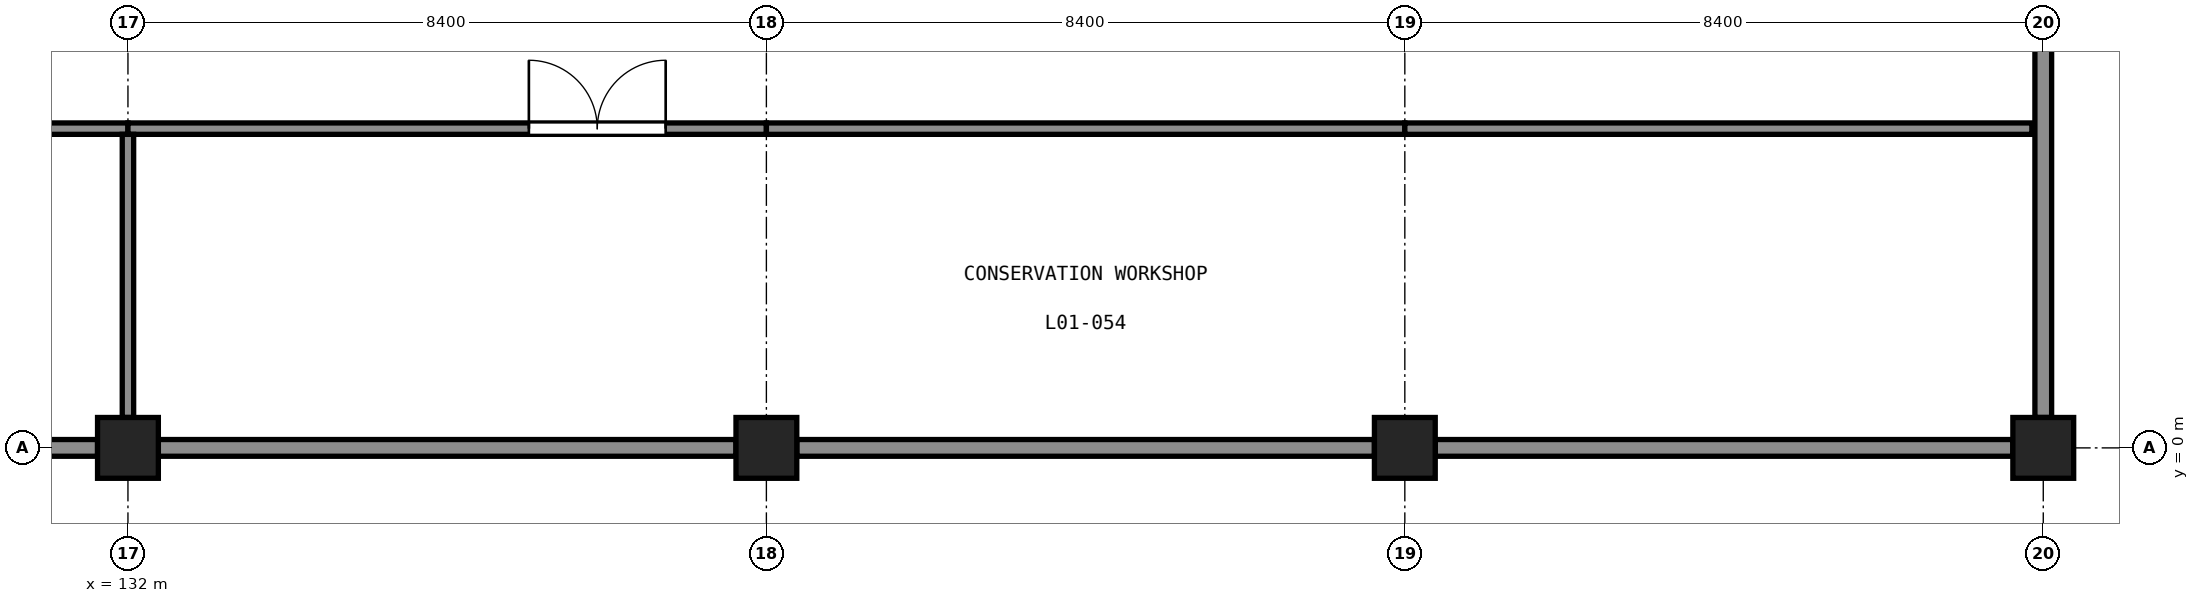
"""IFC4 building model, lengths in metres.
Left out: names, types, materials, properties, quantities, classifications, styles, units other than length and angle.
Written with IfcOpenShell. Run it as: python <this file> out.ifc"""

import sys

from ifc_helpers import new_model, si_unit, direction, frame, frame_2d, origin, origin_2d, place, context, subcontext, project, spatial, rectangle, extrude, element, fill, save


model = new_model("IFC4")
c1 = context("Model", 3, precision=1e-05, world=origin(), true_north=direction((0.0, 1.0)))
c2 = subcontext(c1, "Body", "Model", "MODEL_VIEW")
j1 = project(units=[si_unit("LENGTHUNIT", "METRE"), si_unit("PLANEANGLEUNIT", "RADIAN")], contexts=[c1])
p1 = place(None, origin())
s1 = spatial("IfcSite", under=j1, at=p1, CompositionType="ELEMENT")
p2 = place(p1, origin())
s2 = spatial("IfcBuilding", under=s1, at=p2, CompositionType="ELEMENT")
p3 = place(p2, frame((0.0, 0.0, 5.5)))
s3 = spatial("IfcBuildingStorey", under=s2, at=p3, CompositionType="ELEMENT", Elevation=5.5)
for number, where, z_axis, x_axis in (
    (1, (132.0, 0.0, 0.0), (0.0, 0.0, 1.0), (1.0, 0.0, 0.0)),
    (2, (140.4, 0.0, 0.0), (0.0, 0.0, 1.0), (1.0, 0.0, 0.0)),
    (3, (148.8, 0.0, 0.0), (0.0, 0.0, 1.0), (1.0, 0.0, 0.0)),
    (4, (157.2, 0.0, 0.0), (0.0, 0.0, 1.0), (1.0, 0.0, 0.0)),
):
    element("IfcColumn", number, at=place(p3, frame(where, z_axis=z_axis, x_axis=x_axis)), inside=s3, PredefinedType="COLUMN", context=c2, shape_type="SweptSolid", body=[
        extrude(rectangle(XDim=0.8, YDim=0.8, at=origin_2d()), origin(), (0.0, 0.0, 1.0), 5.0),
    ])
for number, where, z_axis, x_axis in (
    (5, (124.0, 0.0, 0.0), (0.0, 0.0, 1.0), (1.0, 0.0, 0.0)),
    (6, (132.4, 0.0, 0.0), (0.0, 0.0, 1.0), (1.0, 0.0, 0.0)),
):
    element("IfcWall", number, at=place(p3, frame(where, z_axis=z_axis, x_axis=x_axis)), inside=s3, PredefinedType="SOLIDWALL", context=c2, shape_type="SweptSolid", body=[
        extrude(rectangle(XDim=7.6, YDim=0.22, at=frame_2d((3.8, 0.0))), origin(), (0.0, 0.0, 1.0), 3.94),
    ])
p4 = place(p3, frame((140.8, 0.0, 0.0), z_axis=(0.0, 0.0, 1.0), x_axis=(1.0, 0.0, 0.0)))
e7 = element("IfcWall", 7, at=p4, inside=s3, PredefinedType="SOLIDWALL", context=c2, shape_type="SweptSolid", body=[
    extrude(rectangle(XDim=7.6, YDim=0.22, at=frame_2d((3.8, 0.0))), origin(), (0.0, 0.0, 1.0), 3.94),
])
for number, where, z_axis, x_axis in (
    (8, (149.2, 0.0, 0.0), (0.0, 0.0, 1.0), (1.0, 0.0, 0.0)),
    (9, (157.2, 0.4, 0.0), (0.0, 0.0, 1.0), (0.0, 1.0, 0.0)),
):
    element("IfcWall", number, at=place(p3, frame(where, z_axis=z_axis, x_axis=x_axis)), inside=s3, PredefinedType="SOLIDWALL", context=c2, shape_type="SweptSolid", body=[
        extrude(rectangle(XDim=7.6, YDim=0.22, at=frame_2d((3.8, 0.0))), origin(), (0.0, 0.0, 1.0), 3.94),
    ])
p5 = place(p3, frame((123.6, 4.2, 0.0), z_axis=(0.0, 0.0, 1.0), x_axis=(1.0, 0.0, 0.0)))
e10 = element("IfcWall", 10, at=p5, inside=s3, PredefinedType="PARTITIONING", context=c2, shape_type="SweptSolid", body=[
    extrude(rectangle(XDim=8.4, YDim=0.15, at=frame_2d((4.2, 0.0))), origin(), (0.0, 0.0, 1.0), 3.9),
])
p6 = place(p3, frame((132.0, 4.2, 0.0), z_axis=(0.0, 0.0, 1.0), x_axis=(1.0, 0.0, 0.0)))
e11 = element("IfcWall", 11, at=p6, inside=s3, PredefinedType="PARTITIONING", context=c2, shape_type="SweptSolid", body=[
    extrude(rectangle(XDim=8.4, YDim=0.15, at=frame_2d((4.2, 0.0))), origin(), (0.0, 0.0, 1.0), 3.9),
])
p7 = place(p6, frame((5.275, 0.0, 0.0)))
e12 = element("IfcOpeningElement", 12, at=p7, cuts=e11, PredefinedType="OPENING", context=c2, shape_type="SweptSolid", body=[
    extrude(rectangle(XDim=1.8, YDim=2.1, at=frame_2d((0.9, 1.05))), frame((0.0, 0.085, 0.0), z_axis=(0.0, -1.0, 0.0), x_axis=(1.0, 0.0, 0.0)), (0.0, 0.0, 1.0), 0.17),
])
p8 = place(p3, frame((140.4, 4.2, 0.0), z_axis=(0.0, 0.0, 1.0), x_axis=(1.0, 0.0, 0.0)))
e13 = element("IfcWall", 13, at=p8, inside=s3, PredefinedType="PARTITIONING", context=c2, shape_type="SweptSolid", body=[
    extrude(rectangle(XDim=8.4, YDim=0.15, at=frame_2d((4.2, 0.0))), origin(), (0.0, 0.0, 1.0), 3.9),
])
p9 = place(p3, frame((148.8, 4.2, 0.0), z_axis=(0.0, 0.0, 1.0), x_axis=(1.0, 0.0, 0.0)))
e14 = element("IfcWall", 14, at=p9, inside=s3, PredefinedType="PARTITIONING", context=c2, shape_type="SweptSolid", body=[
    extrude(rectangle(XDim=8.25, YDim=0.15, at=frame_2d((4.125, 0.0))), origin(), (0.0, 0.0, 1.0), 3.9),
])
p10 = place(p3, frame((132.0, 0.4, 0.0), z_axis=(0.0, 0.0, 1.0), x_axis=(0.0, 1.0, 0.0)))
e15 = element("IfcWall", 15, at=p10, inside=s3, PredefinedType="PARTITIONING", context=c2, shape_type="SweptSolid", body=[
    extrude(rectangle(XDim=3.725, YDim=0.15, at=frame_2d((1.863, 0.0))), origin(), (0.0, 0.0, 1.0), 3.9),
])
p11 = place(p7, origin())
e16 = element("IfcDoor", 16, at=p11, inside=s3, OperationType="DOUBLE_DOOR_SINGLE_SWING", PredefinedType="DOOR", context=c2, shape_type="SweptSolid", body=[
    extrude(rectangle(XDim=1.8, YDim=2.1, at=frame_2d((0.9, 1.05))), frame((0.0, 0.025, 0.0), z_axis=(0.0, -1.0, 0.0), x_axis=(1.0, 0.0, 0.0)), (0.0, 0.0, 1.0), 0.05),
])
fill(e12, e16)
save(model, sys.argv[1])
